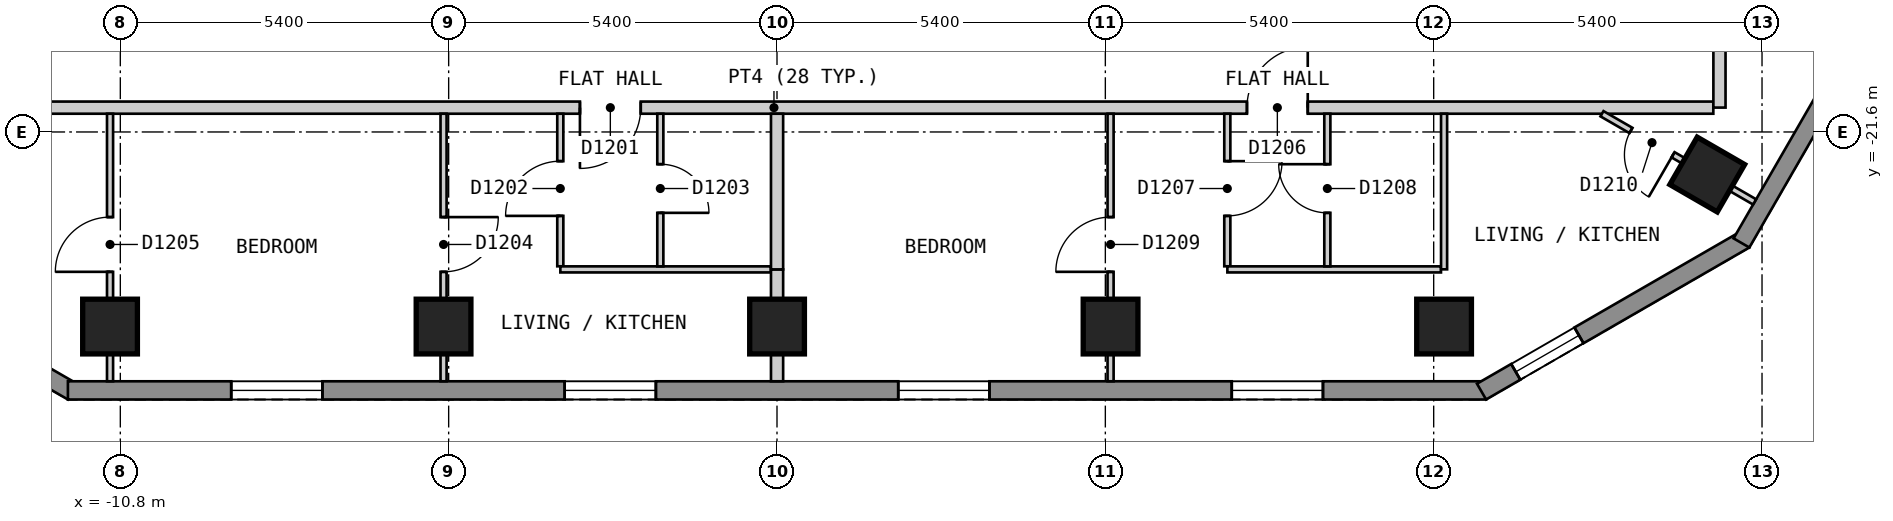
"""IFC4 building model, lengths in metres.
Left out: names, types, materials, properties, quantities, classifications, styles, units other than length and angle.
Written with IfcOpenShell. Run it as: python <this file> out.ifc"""

import sys

from ifc_helpers import new_model, si_unit, direction, frame, frame_2d, origin, origin_2d, place, context, subcontext, project, spatial, polyline, rectangle, outline, extrude, element, fill, save


model = new_model("IFC4")
c1 = context("Model", 3, precision=1e-05, world=origin(), true_north=direction((0.0, 1.0)))
c2 = subcontext(c1, "Body", "Model", "MODEL_VIEW")
j1 = project(units=[si_unit("LENGTHUNIT", "METRE"), si_unit("PLANEANGLEUNIT", "RADIAN")], contexts=[c1])
p1 = place(None, origin())
s1 = spatial("IfcSite", under=j1, at=p1, CompositionType="ELEMENT")
p2 = place(p1, origin())
s2 = spatial("IfcBuilding", under=s1, at=p2, CompositionType="ELEMENT")
p3 = place(p2, frame((0.0, 0.0, 117.6)))
s3 = spatial("IfcBuildingStorey", under=s2, at=p3, CompositionType="ELEMENT", Elevation=117.6)
for number, where, z_axis, x_axis in (
    (1, (-10.969, -24.8, 0.0), (0.0, 0.0, 1.0), (1.0, 0.0, 0.0)),
    (2, (-5.484, -24.8, 0.0), (0.0, 0.0, 1.0), (1.0, 0.0, 0.0)),
    (3, (0.001, -24.8, 0.0), (0.0, 0.0, 1.0), (1.0, 0.0, 0.0)),
    (4, (5.486, -24.8, 0.0), (0.0, 0.0, 1.0), (1.0, 0.0, 0.0)),
    (5, (10.971, -24.8, 0.0), (0.0, 0.0, 1.0), (1.0, 0.0, 0.0)),
    (6, (15.299, -22.3, 0.0), (0.0, 0.0, 1.0), (0.5, 0.866, 0.0)),
):
    element("IfcColumn", number, at=place(p3, frame(where, z_axis=z_axis, x_axis=x_axis)), inside=s3, PredefinedType="COLUMN", context=c2, shape_type="SweptSolid", body=[
        extrude(rectangle(XDim=0.9, YDim=0.9, at=origin_2d()), origin(), (0.0, 0.0, 1.0), 3.0),
    ])
p4 = place(p3, frame((-15.917, -23.37, 0.0), z_axis=(0.0, 0.0, 1.0), x_axis=(0.866022959057, -0.500004234368, 0.0)))
e7 = element("IfcWall", 7, at=p4, inside=s3, PredefinedType="SOLIDWALL", context=c2, shape_type="SweptSolid", body=[
    extrude(outline(polyline([(0.0, -0.15), (5.0, -0.15), (4.92, 0.15), (0.08, 0.15), (0.0, -0.15)])), origin(), (0.0, 0.0, 1.0), 2.7),
])
p5 = place(p4, frame((0.65, 0.0, 0.15)))
e8 = element("IfcOpeningElement", 8, at=p5, cuts=e7, PredefinedType="OPENING", context=c2, shape_type="SweptSolid", body=[
    extrude(rectangle(XDim=1.2, YDim=2.1, at=frame_2d((0.6, 1.05))), frame((0.0, 0.16, 0.0), z_axis=(0.0, -1.0, 0.0), x_axis=(1.0, 0.0, 0.0)), (0.0, 0.0, 1.0), 0.32),
])
p6 = place(p3, frame((-11.662, -25.85, 0.0), z_axis=(0.0, 0.0, 1.0), x_axis=(1.0, 0.0, 0.0)))
e9 = element("IfcWall", 9, at=p6, inside=s3, PredefinedType="SOLIDWALL", context=c2, shape_type="SweptSolid", body=[
    extrude(outline(polyline([(0.0, -0.15), (23.324, -0.15), (23.244, 0.15), (0.08, 0.15), (0.0, -0.15)])), origin(), (0.0, 0.0, 1.0), 2.7),
])
p7 = place(p6, frame((2.686, 0.0, 0.15)))
e10 = element("IfcOpeningElement", 10, at=p7, cuts=e9, PredefinedType="OPENING", context=c2, shape_type="SweptSolid", body=[
    extrude(rectangle(XDim=1.5, YDim=2.1, at=frame_2d((0.75, 1.05))), frame((0.0, 0.16, 0.0), z_axis=(0.0, -1.0, 0.0), x_axis=(1.0, 0.0, 0.0)), (0.0, 0.0, 1.0), 0.32),
])
p8 = place(p6, frame((8.17, 0.0, 0.15)))
e11 = element("IfcOpeningElement", 11, at=p8, cuts=e9, PredefinedType="OPENING", context=c2, shape_type="SweptSolid", body=[
    extrude(rectangle(XDim=1.5, YDim=2.1, at=frame_2d((0.75, 1.05))), frame((0.0, 0.16, 0.0), z_axis=(0.0, -1.0, 0.0), x_axis=(1.0, 0.0, 0.0)), (0.0, 0.0, 1.0), 0.32),
])
p9 = place(p6, frame((13.656, 0.0, 0.15)))
e12 = element("IfcOpeningElement", 12, at=p9, cuts=e9, PredefinedType="OPENING", context=c2, shape_type="SweptSolid", body=[
    extrude(rectangle(XDim=1.5, YDim=2.1, at=frame_2d((0.75, 1.05))), frame((0.0, 0.16, 0.0), z_axis=(0.0, -1.0, 0.0), x_axis=(1.0, 0.0, 0.0)), (0.0, 0.0, 1.0), 0.32),
])
p10 = place(p6, frame((19.141, 0.0, 0.15)))
e13 = element("IfcOpeningElement", 13, at=p10, cuts=e9, PredefinedType="OPENING", context=c2, shape_type="SweptSolid", body=[
    extrude(rectangle(XDim=1.5, YDim=2.1, at=frame_2d((0.75, 1.05))), frame((0.0, 0.16, 0.0), z_axis=(0.0, -1.0, 0.0), x_axis=(1.0, 0.0, 0.0)), (0.0, 0.0, 1.0), 0.32),
])
p11 = place(p3, frame((11.587, -25.87, 0.0), z_axis=(0.0, 0.0, 1.0), x_axis=(0.866022959057, 0.500004234368, 0.0)))
e14 = element("IfcWall", 14, at=p11, inside=s3, PredefinedType="SOLIDWALL", context=c2, shape_type="SweptSolid", body=[
    extrude(outline(polyline([(0.0, -0.15), (5.0, -0.15), (4.92, 0.15), (0.08, 0.15), (0.0, -0.15)])), origin(), (0.0, 0.0, 1.0), 2.7),
])
p12 = place(p11, frame((0.65, 0.0, 0.15)))
e15 = element("IfcOpeningElement", 15, at=p12, cuts=e14, PredefinedType="OPENING", context=c2, shape_type="SweptSolid", body=[
    extrude(rectangle(XDim=1.2, YDim=2.1, at=frame_2d((0.6, 1.05))), frame((0.0, 0.16, 0.0), z_axis=(0.0, -1.0, 0.0), x_axis=(1.0, 0.0, 0.0)), (0.0, 0.0, 1.0), 0.32),
])
p13 = place(p3, frame((15.862, -23.425, 0.0), z_axis=(0.0, 0.0, 1.0), x_axis=(0.500017503135, 0.866015298109, 0.0)))
e16 = element("IfcWall", 16, at=p13, inside=s3, PredefinedType="SOLIDWALL", context=c2, shape_type="SweptSolid", body=[
    extrude(outline(polyline([(0.0, -0.15), (24.711, -0.15), (24.631, 0.15), (0.08, 0.15), (0.0, -0.15)])), origin(), (0.0, 0.0, 1.0), 2.7),
])
p14 = place(p13, frame((2.857, 0.0, 0.15)))
e17 = element("IfcOpeningElement", 17, at=p14, cuts=e16, PredefinedType="OPENING", context=c2, shape_type="SweptSolid", body=[
    extrude(rectangle(XDim=1.5, YDim=2.1, at=frame_2d((0.75, 1.05))), frame((0.0, 0.16, 0.0), z_axis=(0.0, -1.0, 0.0), x_axis=(1.0, 0.0, 0.0)), (0.0, 0.0, 1.0), 0.32),
])
p15 = place(p13, frame((8.689, 0.0, 0.15)))
e18 = element("IfcOpeningElement", 18, at=p15, cuts=e16, PredefinedType="OPENING", context=c2, shape_type="SweptSolid", body=[
    extrude(rectangle(XDim=1.5, YDim=2.1, at=frame_2d((0.75, 1.05))), frame((0.0, 0.16, 0.0), z_axis=(0.0, -1.0, 0.0), x_axis=(1.0, 0.0, 0.0)), (0.0, 0.0, 1.0), 0.32),
])
p16 = place(p13, frame((14.52, 0.0, 0.15)))
e19 = element("IfcOpeningElement", 19, at=p16, cuts=e16, PredefinedType="OPENING", context=c2, shape_type="SweptSolid", body=[
    extrude(rectangle(XDim=1.5, YDim=2.1, at=frame_2d((0.75, 1.05))), frame((0.0, 0.16, 0.0), z_axis=(0.0, -1.0, 0.0), x_axis=(1.0, 0.0, 0.0)), (0.0, 0.0, 1.0), 0.32),
])
p17 = place(p13, frame((20.351, 0.0, 0.15)))
e20 = element("IfcOpeningElement", 20, at=p17, cuts=e16, PredefinedType="OPENING", context=c2, shape_type="SweptSolid", body=[
    extrude(rectangle(XDim=1.5, YDim=2.1, at=frame_2d((0.75, 1.05))), frame((0.0, 0.16, 0.0), z_axis=(0.0, -1.0, 0.0), x_axis=(1.0, 0.0, 0.0)), (0.0, 0.0, 1.0), 0.32),
])
p18 = place(p3, frame((-15.499, -21.2, 0.0), z_axis=(0.0, 0.0, 1.0), x_axis=(1.0, 0.0, 0.0)))
e21 = element("IfcWall", 21, at=p18, inside=s3, PredefinedType="PARTITIONING", context=c2, shape_type="SweptSolid", body=[
    extrude(rectangle(XDim=30.898, YDim=0.2, at=frame_2d((15.449, 0.0))), origin(), (0.0, 0.0, 1.0), 2.7),
])
p19 = place(p18, frame((12.258, 0.0, 0.0)))
e22 = element("IfcOpeningElement", 22, at=p19, cuts=e21, PredefinedType="OPENING", context=c2, shape_type="SweptSolid", body=[
    extrude(rectangle(XDim=1.0, YDim=2.1, at=frame_2d((0.5, 1.05))), frame((0.0, 0.11, 0.0), z_axis=(0.0, -1.0, 0.0), x_axis=(1.0, 0.0, 0.0)), (0.0, 0.0, 1.0), 0.22),
])
p20 = place(p18, frame((23.228, 0.0, 0.0)))
e23 = element("IfcOpeningElement", 23, at=p20, cuts=e21, PredefinedType="OPENING", context=c2, shape_type="SweptSolid", body=[
    extrude(rectangle(XDim=1.0, YDim=2.1, at=frame_2d((0.5, 1.05))), frame((0.0, 0.11, 0.0), z_axis=(0.0, -1.0, 0.0), x_axis=(1.0, 0.0, 0.0)), (0.0, 0.0, 1.0), 0.22),
])
p21 = place(p3, frame((15.5, -21.199, 0.0), z_axis=(0.0, 0.0, 1.0), x_axis=(0.0, 1.0, 0.0)))
e24 = element("IfcWall", 24, at=p21, inside=s3, PredefinedType="PARTITIONING", context=c2, shape_type="SweptSolid", body=[
    extrude(rectangle(XDim=17.647, YDim=0.2, at=frame_2d((8.823, 0.0))), origin(), (0.0, 0.0, 1.0), 2.7),
])
p22 = place(p21, frame((14.934, 0.0, 0.0)))
e25 = element("IfcOpeningElement", 25, at=p22, cuts=e24, PredefinedType="OPENING", context=c2, shape_type="SweptSolid", body=[
    extrude(rectangle(XDim=1.0, YDim=2.1, at=frame_2d((0.5, 1.05))), frame((0.0, 0.11, 0.0), z_axis=(0.0, -1.0, 0.0), x_axis=(1.0, 0.0, 0.0)), (0.0, 0.0, 1.0), 0.22),
])
p23 = place(p3, frame((-3.564, -21.3, 0.0), z_axis=(0.0, 0.0, 1.0), x_axis=(0.0, -1.0, 0.0)))
e26 = element("IfcWall", 26, at=p23, inside=s3, PredefinedType="PARTITIONING", context=c2, shape_type="SweptSolid", body=[
    extrude(rectangle(XDim=2.509, YDim=0.1, at=frame_2d((1.254, 0.0))), origin(), (0.0, 0.0, 1.0), 2.7),
])
p24 = place(p23, frame((0.78, 0.0, 0.0)))
e27 = element("IfcOpeningElement", 27, at=p24, cuts=e26, PredefinedType="OPENING", context=c2, shape_type="SweptSolid", body=[
    extrude(rectangle(XDim=0.9, YDim=2.1, at=frame_2d((0.45, 1.05))), frame((0.0, 0.06, 0.0), z_axis=(0.0, -1.0, 0.0), x_axis=(1.0, 0.0, 0.0)), (0.0, 0.0, 1.0), 0.12),
])
p25 = place(p3, frame((7.406, -21.3, 0.0), z_axis=(0.0, 0.0, 1.0), x_axis=(0.0, -1.0, 0.0)))
e28 = element("IfcWall", 28, at=p25, inside=s3, PredefinedType="PARTITIONING", context=c2, shape_type="SweptSolid", body=[
    extrude(rectangle(XDim=2.509, YDim=0.1, at=frame_2d((1.254, 0.0))), origin(), (0.0, 0.0, 1.0), 2.7),
])
p26 = place(p25, frame((0.78, 0.0, 0.0)))
e29 = element("IfcOpeningElement", 29, at=p26, cuts=e28, PredefinedType="OPENING", context=c2, shape_type="SweptSolid", body=[
    extrude(rectangle(XDim=0.9, YDim=2.1, at=frame_2d((0.45, 1.05))), frame((0.0, 0.06, 0.0), z_axis=(0.0, -1.0, 0.0), x_axis=(1.0, 0.0, 0.0)), (0.0, 0.0, 1.0), 0.12),
])
p27 = place(p3, frame((13.568, -21.3, 0.0), z_axis=(0.0, 0.0, 1.0), x_axis=(0.865885342641, -0.500242514586, 0.0)))
e30 = element("IfcWall", 30, at=p27, inside=s3, PredefinedType="PARTITIONING", context=c2, shape_type="SweptSolid", body=[
    extrude(rectangle(XDim=2.898, YDim=0.1, at=frame_2d((1.449, 0.0))), origin(), (0.0, 0.0, 1.0), 2.7),
])
p28 = place(p27, frame((0.55, 0.0, 0.0)))
e31 = element("IfcOpeningElement", 31, at=p28, cuts=e30, PredefinedType="OPENING", context=c2, shape_type="SweptSolid", body=[
    extrude(rectangle(XDim=0.8, YDim=2.1, at=frame_2d((0.4, 1.05))), frame((0.0, 0.06, 0.0), z_axis=(0.0, -1.0, 0.0), x_axis=(1.0, 0.0, 0.0)), (0.0, 0.0, 1.0), 0.12),
])
p29 = place(p3, frame((-3.563, -23.86, 0.0), z_axis=(0.0, 0.0, 1.0), x_axis=(1.0, 0.0, 0.0)))
e32 = element("IfcWall", 32, at=p29, inside=s3, PredefinedType="PARTITIONING", context=c2, shape_type="SweptSolid", body=[
    extrude(rectangle(XDim=3.464, YDim=0.1, at=frame_2d((1.732, 0.0))), origin(), (0.0, 0.0, 1.0), 2.7),
])
p30 = place(p3, frame((7.407, -23.86, 0.0), z_axis=(0.0, 0.0, 1.0), x_axis=(1.0, 0.0, 0.0)))
e33 = element("IfcWall", 33, at=p30, inside=s3, PredefinedType="PARTITIONING", context=c2, shape_type="SweptSolid", body=[
    extrude(rectangle(XDim=3.513, YDim=0.1, at=frame_2d((1.756, 0.0))), origin(), (0.0, 0.0, 1.0), 2.7),
])
p31 = place(p3, frame((5.486, -25.7, 0.0), z_axis=(0.0, 0.0, 1.0), x_axis=(0.0, 1.0, 0.0)))
e34 = element("IfcWall", 34, at=p31, inside=s3, PredefinedType="PARTITIONING", context=c2, shape_type="SweptSolid", body=[
    extrude(rectangle(XDim=4.4, YDim=0.1, at=frame_2d((2.2, 0.0))), origin(), (0.0, 0.0, 1.0), 2.7),
])
p32 = place(p31, frame((1.8, 0.0, 0.0)))
e35 = element("IfcOpeningElement", 35, at=p32, cuts=e34, PredefinedType="OPENING", context=c2, shape_type="SweptSolid", body=[
    extrude(rectangle(XDim=0.9, YDim=2.1, at=frame_2d((0.45, 1.05))), frame((0.0, 0.06, 0.0), z_axis=(0.0, -1.0, 0.0), x_axis=(1.0, 0.0, 0.0)), (0.0, 0.0, 1.0), 0.12),
])
p33 = place(p3, frame((9.051, -23.81, 0.0), z_axis=(0.0, 0.0, 1.0), x_axis=(0.0, 1.0, 0.0)))
e36 = element("IfcWall", 36, at=p33, inside=s3, PredefinedType="PARTITIONING", context=c2, shape_type="SweptSolid", body=[
    extrude(rectangle(XDim=2.51, YDim=0.1, at=frame_2d((1.255, 0.0))), origin(), (0.0, 0.0, 1.0), 2.7),
])
p34 = place(p33, frame((0.88, 0.0, 0.0)))
e37 = element("IfcOpeningElement", 37, at=p34, cuts=e36, PredefinedType="OPENING", context=c2, shape_type="SweptSolid", body=[
    extrude(rectangle(XDim=0.8, YDim=2.1, at=frame_2d((0.4, 1.05))), frame((0.0, 0.06, 0.0), z_axis=(0.0, -1.0, 0.0), x_axis=(1.0, 0.0, 0.0)), (0.0, 0.0, 1.0), 0.12),
])
p35 = place(p3, frame((10.971, -23.859, 0.0), z_axis=(0.0, 0.0, 1.0), x_axis=(0.0, 1.0, 0.0)))
e38 = element("IfcWall", 38, at=p35, inside=s3, PredefinedType="PARTITIONING", context=c2, shape_type="SweptSolid", body=[
    extrude(rectangle(XDim=2.559, YDim=0.1, at=frame_2d((1.279, 0.0))), origin(), (0.0, 0.0, 1.0), 2.7),
])
p36 = place(p3, frame((-5.484, -25.7, 0.0), z_axis=(0.0, 0.0, 1.0), x_axis=(0.0, 1.0, 0.0)))
e39 = element("IfcWall", 39, at=p36, inside=s3, PredefinedType="PARTITIONING", context=c2, shape_type="SweptSolid", body=[
    extrude(rectangle(XDim=4.4, YDim=0.1, at=frame_2d((2.2, 0.0))), origin(), (0.0, 0.0, 1.0), 2.7),
])
p37 = place(p36, frame((1.8, 0.0, 0.0)))
e40 = element("IfcOpeningElement", 40, at=p37, cuts=e39, PredefinedType="OPENING", context=c2, shape_type="SweptSolid", body=[
    extrude(rectangle(XDim=0.9, YDim=2.1, at=frame_2d((0.45, 1.05))), frame((0.0, 0.06, 0.0), z_axis=(0.0, -1.0, 0.0), x_axis=(1.0, 0.0, 0.0)), (0.0, 0.0, 1.0), 0.12),
])
p38 = place(p3, frame((-10.969, -25.7, 0.0), z_axis=(0.0, 0.0, 1.0), x_axis=(0.0, 1.0, 0.0)))
e41 = element("IfcWall", 41, at=p38, inside=s3, PredefinedType="PARTITIONING", context=c2, shape_type="SweptSolid", body=[
    extrude(rectangle(XDim=4.4, YDim=0.1, at=frame_2d((2.2, 0.0))), origin(), (0.0, 0.0, 1.0), 2.7),
])
p39 = place(p38, frame((1.8, 0.0, 0.0)))
e42 = element("IfcOpeningElement", 42, at=p39, cuts=e41, PredefinedType="OPENING", context=c2, shape_type="SweptSolid", body=[
    extrude(rectangle(XDim=0.9, YDim=2.1, at=frame_2d((0.45, 1.05))), frame((0.0, 0.06, 0.0), z_axis=(0.0, -1.0, 0.0), x_axis=(1.0, 0.0, 0.0)), (0.0, 0.0, 1.0), 0.12),
])
p40 = place(p3, frame((-1.919, -23.81, 0.0), z_axis=(0.0, 0.0, 1.0), x_axis=(0.0, 1.0, 0.0)))
e43 = element("IfcWall", 43, at=p40, inside=s3, PredefinedType="PARTITIONING", context=c2, shape_type="SweptSolid", body=[
    extrude(rectangle(XDim=2.51, YDim=0.1, at=frame_2d((1.255, 0.0))), origin(), (0.0, 0.0, 1.0), 2.7),
])
p41 = place(p40, frame((0.88, 0.0, 0.0)))
e44 = element("IfcOpeningElement", 44, at=p41, cuts=e43, PredefinedType="OPENING", context=c2, shape_type="SweptSolid", body=[
    extrude(rectangle(XDim=0.8, YDim=2.1, at=frame_2d((0.4, 1.05))), frame((0.0, 0.06, 0.0), z_axis=(0.0, -1.0, 0.0), x_axis=(1.0, 0.0, 0.0)), (0.0, 0.0, 1.0), 0.12),
])
p42 = place(p3, frame((0.001, -23.86, 0.0), z_axis=(0.0, 0.0, 1.0), x_axis=(0.0, -1.0, 0.0)))
e45 = element("IfcWall", 45, at=p42, inside=s3, PredefinedType="PARTITIONING", context=c2, shape_type="SweptSolid", body=[
    extrude(rectangle(XDim=1.84, YDim=0.2, at=frame_2d((0.92, 0.0))), origin(), (0.0, 0.0, 1.0), 2.7),
])
p43 = place(p3, frame((0.001, -23.86, 0.0), z_axis=(0.0, 0.0, 1.0), x_axis=(0.0, 1.0, 0.0)))
e46 = element("IfcWall", 46, at=p43, inside=s3, PredefinedType="PARTITIONING", context=c2, shape_type="SweptSolid", body=[
    extrude(rectangle(XDim=2.56, YDim=0.2, at=frame_2d((1.28, 0.0))), origin(), (0.0, 0.0, 1.0), 2.7),
])
p44 = place(p7, origin())
e47 = element("IfcWindow", 47, at=p44, inside=s3, PartitioningType="SINGLE_PANEL", PredefinedType="WINDOW", context=c2, shape_type="SweptSolid", body=[
    extrude(rectangle(XDim=1.5, YDim=2.1, at=frame_2d((0.75, 1.05))), frame((0.0, 0.03, 0.0), z_axis=(0.0, -1.0, 0.0), x_axis=(1.0, 0.0, 0.0)), (0.0, 0.0, 1.0), 0.06),
])
fill(e10, e47)
p45 = place(p8, origin())
e48 = element("IfcWindow", 48, at=p45, inside=s3, PartitioningType="SINGLE_PANEL", PredefinedType="WINDOW", context=c2, shape_type="SweptSolid", body=[
    extrude(rectangle(XDim=1.5, YDim=2.1, at=frame_2d((0.75, 1.05))), frame((0.0, 0.03, 0.0), z_axis=(0.0, -1.0, 0.0), x_axis=(1.0, 0.0, 0.0)), (0.0, 0.0, 1.0), 0.06),
])
fill(e11, e48)
p46 = place(p9, origin())
e49 = element("IfcWindow", 49, at=p46, inside=s3, PartitioningType="SINGLE_PANEL", PredefinedType="WINDOW", context=c2, shape_type="SweptSolid", body=[
    extrude(rectangle(XDim=1.5, YDim=2.1, at=frame_2d((0.75, 1.05))), frame((0.0, 0.03, 0.0), z_axis=(0.0, -1.0, 0.0), x_axis=(1.0, 0.0, 0.0)), (0.0, 0.0, 1.0), 0.06),
])
fill(e12, e49)
p47 = place(p10, origin())
e50 = element("IfcWindow", 50, at=p47, inside=s3, PartitioningType="SINGLE_PANEL", PredefinedType="WINDOW", context=c2, shape_type="SweptSolid", body=[
    extrude(rectangle(XDim=1.5, YDim=2.1, at=frame_2d((0.75, 1.05))), frame((0.0, 0.03, 0.0), z_axis=(0.0, -1.0, 0.0), x_axis=(1.0, 0.0, 0.0)), (0.0, 0.0, 1.0), 0.06),
])
fill(e13, e50)
p48 = place(p12, origin())
e51 = element("IfcWindow", 51, at=p48, inside=s3, PartitioningType="SINGLE_PANEL", PredefinedType="WINDOW", context=c2, shape_type="SweptSolid", body=[
    extrude(rectangle(XDim=1.2, YDim=2.1, at=frame_2d((0.6, 1.05))), frame((0.0, 0.03, 0.0), z_axis=(0.0, -1.0, 0.0), x_axis=(1.0, 0.0, 0.0)), (0.0, 0.0, 1.0), 0.06),
])
fill(e15, e51)
p49 = place(p19, origin())
e52 = element("IfcDoor", 52, at=p49, inside=s3, OperationType="SINGLE_SWING_LEFT", PredefinedType="DOOR", context=c2, shape_type="SweptSolid", body=[
    extrude(rectangle(XDim=1.0, YDim=2.1, at=frame_2d((0.5, 1.05))), frame((0.0, 0.025, 0.0), z_axis=(0.0, -1.0, 0.0), x_axis=(1.0, 0.0, 0.0)), (0.0, 0.0, 1.0), 0.05),
])
fill(e22, e52)
p50 = place(p24, origin())
e53 = element("IfcDoor", 53, at=p50, inside=s3, OperationType="SINGLE_SWING_RIGHT", PredefinedType="DOOR", context=c2, shape_type="SweptSolid", body=[
    extrude(rectangle(XDim=0.9, YDim=2.1, at=frame_2d((0.45, 1.05))), frame((0.0, 0.025, 0.0), z_axis=(0.0, -1.0, 0.0), x_axis=(1.0, 0.0, 0.0)), (0.0, 0.0, 1.0), 0.05),
])
fill(e27, e53)
p51 = place(p41, origin())
e54 = element("IfcDoor", 54, at=p51, inside=s3, OperationType="SINGLE_SWING_LEFT", PredefinedType="DOOR", context=c2, shape_type="SweptSolid", body=[
    extrude(rectangle(XDim=0.8, YDim=2.1, at=frame_2d((0.4, 1.05))), frame((0.0, 0.025, 0.0), z_axis=(0.0, -1.0, 0.0), x_axis=(1.0, 0.0, 0.0)), (0.0, 0.0, 1.0), 0.05),
])
fill(e44, e54)
p52 = place(p37, origin())
e55 = element("IfcDoor", 55, at=p52, inside=s3, OperationType="SINGLE_SWING_RIGHT", PredefinedType="DOOR", context=c2, shape_type="SweptSolid", body=[
    extrude(rectangle(XDim=0.9, YDim=2.1, at=frame_2d((0.45, 1.05))), frame((0.0, 0.025, 0.0), z_axis=(0.0, -1.0, 0.0), x_axis=(1.0, 0.0, 0.0)), (0.0, 0.0, 1.0), 0.05),
])
fill(e40, e55)
p53 = place(p39, origin())
e56 = element("IfcDoor", 56, at=p53, inside=s3, OperationType="SINGLE_SWING_LEFT", PredefinedType="DOOR", context=c2, shape_type="SweptSolid", body=[
    extrude(rectangle(XDim=0.9, YDim=2.1, at=frame_2d((0.45, 1.05))), frame((0.0, 0.025, 0.0), z_axis=(0.0, -1.0, 0.0), x_axis=(1.0, 0.0, 0.0)), (0.0, 0.0, 1.0), 0.05),
])
fill(e42, e56)
p54 = place(p20, origin())
e57 = element("IfcDoor", 57, at=p54, inside=s3, OperationType="SINGLE_SWING_RIGHT", PredefinedType="DOOR", context=c2, shape_type="SweptSolid", body=[
    extrude(rectangle(XDim=1.0, YDim=2.1, at=frame_2d((0.5, 1.05))), frame((0.0, 0.025, 0.0), z_axis=(0.0, -1.0, 0.0), x_axis=(1.0, 0.0, 0.0)), (0.0, 0.0, 1.0), 0.05),
])
fill(e23, e57)
p55 = place(p26, origin())
e58 = element("IfcDoor", 58, at=p55, inside=s3, OperationType="SINGLE_SWING_LEFT", PredefinedType="DOOR", context=c2, shape_type="SweptSolid", body=[
    extrude(rectangle(XDim=0.9, YDim=2.1, at=frame_2d((0.45, 1.05))), frame((0.0, 0.025, 0.0), z_axis=(0.0, -1.0, 0.0), x_axis=(1.0, 0.0, 0.0)), (0.0, 0.0, 1.0), 0.05),
])
fill(e29, e58)
p56 = place(p34, origin())
e59 = element("IfcDoor", 59, at=p56, inside=s3, OperationType="SINGLE_SWING_RIGHT", PredefinedType="DOOR", context=c2, shape_type="SweptSolid", body=[
    extrude(rectangle(XDim=0.8, YDim=2.1, at=frame_2d((0.4, 1.05))), frame((0.0, 0.025, 0.0), z_axis=(0.0, -1.0, 0.0), x_axis=(1.0, 0.0, 0.0)), (0.0, 0.0, 1.0), 0.05),
])
fill(e37, e59)
p57 = place(p32, origin())
e60 = element("IfcDoor", 60, at=p57, inside=s3, OperationType="SINGLE_SWING_LEFT", PredefinedType="DOOR", context=c2, shape_type="SweptSolid", body=[
    extrude(rectangle(XDim=0.9, YDim=2.1, at=frame_2d((0.45, 1.05))), frame((0.0, 0.025, 0.0), z_axis=(0.0, -1.0, 0.0), x_axis=(1.0, 0.0, 0.0)), (0.0, 0.0, 1.0), 0.05),
])
fill(e35, e60)
p58 = place(p28, origin())
e61 = element("IfcDoor", 61, at=p58, inside=s3, OperationType="SINGLE_SWING_RIGHT", PredefinedType="DOOR", context=c2, shape_type="SweptSolid", body=[
    extrude(rectangle(XDim=0.8, YDim=2.1, at=frame_2d((0.4, 1.05))), frame((0.0, 0.025, 0.0), z_axis=(0.0, -1.0, 0.0), x_axis=(1.0, 0.0, 0.0)), (0.0, 0.0, 1.0), 0.05),
])
fill(e31, e61)
save(model, sys.argv[1])
